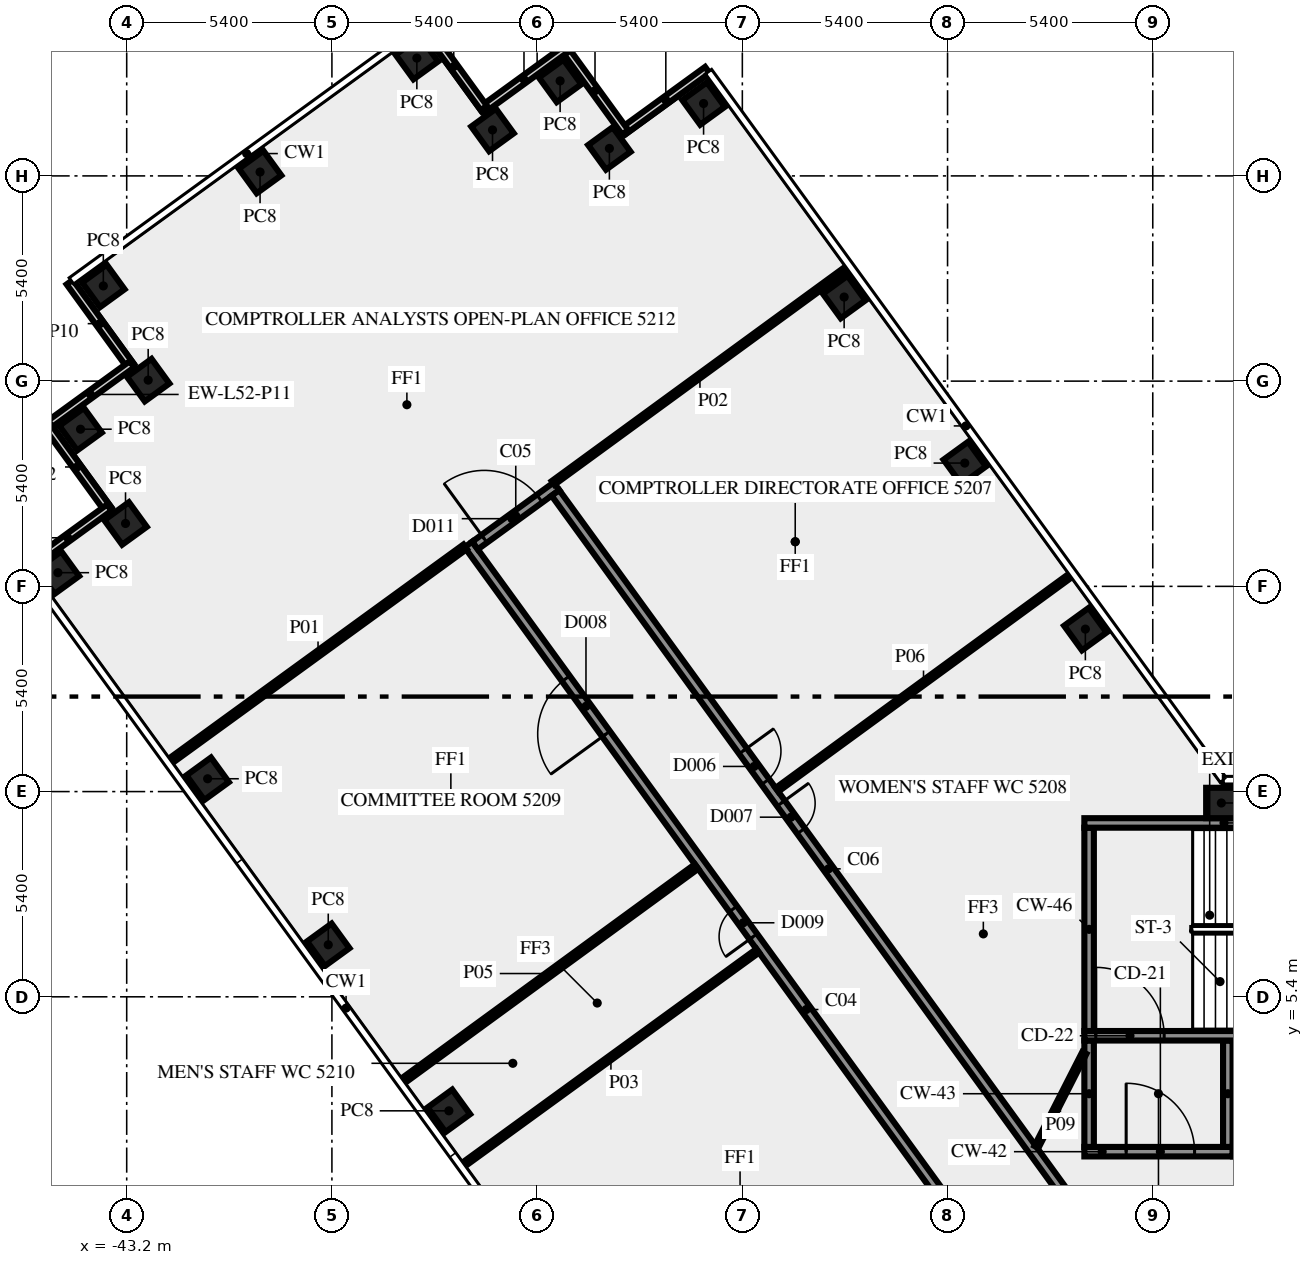
"""IFC4 building model, lengths in metres.
Left out: names, types, materials, properties, quantities, classifications, styles, units other than length and angle.
Written with IfcOpenShell. Run it as: python <this file> out.ifc"""

import sys

from ifc_helpers import new_model, si_unit, direction, frame, frame_2d, origin, origin_2d, place, context, subcontext, project, spatial, rectangle, extrude, element, fill, save


model = new_model("IFC4")
c1 = context("Model", 3, precision=1e-05, world=origin(), true_north=direction((0.0, 1.0)))
c2 = subcontext(c1, "Body", "Model", "MODEL_VIEW")
j1 = project(units=[si_unit("LENGTHUNIT", "METRE"), si_unit("PLANEANGLEUNIT", "RADIAN")], contexts=[c1])
p1 = place(None, origin())
s1 = spatial("IfcSite", under=j1, at=p1, CompositionType="ELEMENT")
p2 = place(p1, origin())
s2 = spatial("IfcBuilding", under=s1, at=p2, CompositionType="ELEMENT")
p3 = place(p2, frame((0.0, 0.0, 222.0)))
s3 = spatial("IfcBuildingStorey", under=s2, at=p3, CompositionType="ELEMENT", Elevation=222.0)
for number, where, z_axis, x_axis in (
    (1, (-17.974, 15.075, 0.0), (0.0, 0.0, 1.0), (-0.588, 0.809, 0.0)),
    (2, (-21.147, 19.444, 0.0), (0.0, 0.0, 1.0), (-0.588, 0.809, 0.0)),
    (3, (-24.321, 23.812, 0.0), (0.0, 0.0, 1.0), (-0.588, 0.809, 0.0)),
    (4, (-28.02, 28.905, 0.0), (0.0, 0.0, 1.0), (-0.809, -0.588, 0.0)),
    (5, (-30.499, 27.723, 0.0), (0.0, 0.0, 1.0), (-0.809, -0.588, 0.0)),
    (6, (-31.795, 29.5, 0.0), (0.0, 0.0, 1.0), (-0.588, 0.809, 0.0)),
    (7, (-33.574, 28.209, 0.0), (0.0, 0.0, 1.0), (-0.588, 0.809, 0.0)),
    (8, (-35.565, 30.1, 0.0), (0.0, 0.0, 1.0), (-0.809, -0.588, 0.0)),
    (9, (-39.691, 27.102, 0.0), (0.0, 0.0, 1.0), (-0.809, -0.588, 0.0)),
    (10, (-43.815, 24.105, 0.0), (0.0, 0.0, 1.0), (-0.809, -0.588, 0.0)),
    (11, (-42.635, 21.626, 0.0), (0.0, 0.0, 1.0), (-0.809, -0.588, 0.0)),
    (12, (-44.415, 20.335, 0.0), (0.0, 0.0, 1.0), (0.588, -0.809, 0.0)),
    (13, (-43.231, 17.854, 0.0), (0.0, 0.0, 1.0), (0.588, -0.809, 0.0)),
    (14, (-45.01, 16.56, 0.0), (0.0, 0.0, 1.0), (0.588, -0.809, 0.0)),
    (15, (-41.07, 11.137, 0.0), (0.0, 0.0, 1.0), (0.588, -0.809, 0.0)),
    (16, (-37.896, 6.769, 0.0), (0.0, 0.0, 1.0), (0.588, -0.809, 0.0)),
    (17, (-34.722, 2.4, 0.0), (0.0, 0.0, 1.0), (0.588, -0.809, 0.0)),
    (18, (-14.395, 10.5, 0.0), (0.0, 0.0, 1.0), (-1.0, 0.0, 0.0)),
):
    element("IfcColumn", number, at=place(p3, frame(where, z_axis=z_axis, x_axis=x_axis)), inside=s3, PredefinedType="COLUMN", context=c2, shape_type="SweptSolid", body=[
        extrude(rectangle(XDim=0.8, YDim=0.8, at=origin_2d()), origin(), (0.0, 0.0, 1.0), 3.65),
    ])
for number, where, z_axis, x_axis in (
    (19, (-27.921, 29.787, 0.0), (0.0, 0.0, 1.0), (-0.809, -0.588, 0.0)),
    (20, (-30.083, 28.149, 0.0), (0.0, 0.0, 1.0), (-0.588, 0.809, 0.0)),
    (21, (-31.654, 30.331, 0.0), (0.0, 0.0, 1.0), (-0.809, -0.588, 0.0)),
    (22, (-33.801, 28.786, 0.0), (0.0, 0.0, 1.0), (-0.588, 0.809, 0.0)),
    (23, (-44.699, 24.205, 0.0), (0.0, 0.0, 1.0), (0.588, -0.809, 0.0)),
    (24, (-43.061, 22.043, 0.0), (0.0, 0.0, 1.0), (-0.809, -0.588, 0.0)),
    (25, (-45.296, 20.434, 0.0), (0.0, 0.0, 1.0), (0.588, -0.809, 0.0)),
    (26, (-43.658, 18.272, 0.0), (0.0, 0.0, 1.0), (-0.809, -0.588, 0.0)),
):
    element("IfcWall", number, at=place(p3, frame(where, z_axis=z_axis, x_axis=x_axis)), inside=s3, PredefinedType="SOLIDWALL", context=c2, shape_type="SweptSolid", body=[
        extrude(rectangle(XDim=2.7, YDim=0.2, at=frame_2d((1.35, 0.0))), origin(), (0.0, 0.0, 1.0), 3.65),
    ])
p4 = place(p3, frame((-18.0, 1.325, 0.0), z_axis=(0.0, 0.0, 1.0), x_axis=(1.0, 0.0, 0.0)))
e27 = element("IfcWall", 27, at=p4, inside=s3, PredefinedType="SHEAR", context=c2, shape_type="SweptSolid", body=[
    extrude(rectangle(XDim=3.9, YDim=0.25, at=frame_2d((1.95, 0.0))), origin(), (0.0, 0.0, 1.0), 3.65),
])
p5 = place(p4, frame((1.1, 0.0, 0.0)))
e28 = element("IfcOpeningElement", 28, at=p5, cuts=e27, PredefinedType="OPENING", context=c2, shape_type="SweptSolid", body=[
    extrude(rectangle(XDim=1.8, YDim=2.1, at=frame_2d((0.9, 1.05))), frame((0.0, 0.135, 0.0), z_axis=(0.0, -1.0, 0.0), x_axis=(1.0, 0.0, 0.0)), (0.0, 0.0, 1.0), 0.27),
])
for number, where, z_axis, x_axis in (
    (29, (-17.875, 1.45, 0.0), (0.0, 0.0, 1.0), (0.0, 1.0, 0.0)),
    (30, (-14.225, 1.45, 0.0), (0.0, 0.0, 1.0), (0.0, 1.0, 0.0)),
):
    element("IfcWall", number, at=place(p3, frame(where, z_axis=z_axis, x_axis=x_axis)), inside=s3, PredefinedType="SHEAR", context=c2, shape_type="SweptSolid", body=[
        extrude(rectangle(XDim=2.8, YDim=0.25, at=frame_2d((1.4, 0.0))), origin(), (0.0, 0.0, 1.0), 3.65),
    ])
p6 = place(p3, frame((-18.0, 4.375, 0.0), z_axis=(0.0, 0.0, 1.0), x_axis=(1.0, 0.0, 0.0)))
e31 = element("IfcWall", 31, at=p6, inside=s3, PredefinedType="SHEAR", context=c2, shape_type="SweptSolid", body=[
    extrude(rectangle(XDim=10.5, YDim=0.25, at=frame_2d((5.25, 0.0))), origin(), (0.0, 0.0, 1.0), 3.65),
])
p7 = place(p6, frame((0.3, 0.0, 0.0)))
e32 = element("IfcOpeningElement", 32, at=p7, cuts=e31, PredefinedType="OPENING", context=c2, shape_type="SweptSolid", body=[
    extrude(rectangle(XDim=1.8, YDim=2.1, at=frame_2d((0.9, 1.05))), frame((0.0, 0.135, 0.0), z_axis=(0.0, -1.0, 0.0), x_axis=(1.0, 0.0, 0.0)), (0.0, 0.0, 1.0), 0.27),
])
p8 = place(p3, frame((-17.875, 4.5, 0.0), z_axis=(0.0, 0.0, 1.0), x_axis=(0.0, 1.0, 0.0)))
e33 = element("IfcWall", 33, at=p8, inside=s3, PredefinedType="SHEAR", context=c2, shape_type="SweptSolid", body=[
    extrude(rectangle(XDim=5.35, YDim=0.25, at=frame_2d((2.675, 0.0))), origin(), (0.0, 0.0, 1.0), 3.65),
])
p9 = place(p3, frame((-18.0, 9.975, 0.0), z_axis=(0.0, 0.0, 1.0), x_axis=(1.0, 0.0, 0.0)))
e34 = element("IfcWall", 34, at=p9, inside=s3, PredefinedType="SHEAR", context=c2, shape_type="SweptSolid", body=[
    extrude(rectangle(XDim=10.5, YDim=0.25, at=frame_2d((5.25, 0.0))), origin(), (0.0, 0.0, 1.0), 3.65),
])
p10 = place(p9, frame((4.5, 0.0, 1.0)))
e35 = element("IfcOpeningElement", 35, at=p10, cuts=e34, PredefinedType="OPENING", context=c2, shape_type="SweptSolid", body=[
    extrude(rectangle(XDim=1.2, YDim=1.2, at=frame_2d((0.6, 0.6))), frame((0.0, 0.135, 0.0), z_axis=(0.0, -1.0, 0.0), x_axis=(1.0, 0.0, 0.0)), (0.0, 0.0, 1.0), 0.27),
])
p11 = place(p3, frame((-20.531, -1.523, 0.0), z_axis=(0.0, 0.0, 1.0), x_axis=(-0.587784239999, 0.809017729849, 0.0)))
e36 = element("IfcWall", 36, at=p11, inside=s3, PredefinedType="SOLIDWALL", context=c2, shape_type="SweptSolid", body=[
    extrude(rectangle(XDim=23.271, YDim=0.25, at=frame_2d((11.635, 0.0))), origin(), (0.0, 0.0, 1.0), 3.65),
])
p12 = place(p11, frame((0.533, 0.0, 0.0)))
e37 = element("IfcOpeningElement", 37, at=p12, cuts=e36, PredefinedType="OPENING", context=c2, shape_type="SweptSolid", body=[
    extrude(rectangle(XDim=0.9, YDim=2.1, at=frame_2d((0.45, 1.05))), frame((0.0, 0.135, 0.0), z_axis=(0.0, -1.0, 0.0), x_axis=(1.0, 0.0, 0.0)), (0.0, 0.0, 1.0), 0.27),
])
p13 = place(p11, frame((17.106, 0.0, 0.0)))
e38 = element("IfcOpeningElement", 38, at=p13, cuts=e36, PredefinedType="OPENING", context=c2, shape_type="SweptSolid", body=[
    extrude(rectangle(XDim=1.8, YDim=2.1, at=frame_2d((0.9, 1.05))), frame((0.0, 0.135, 0.0), z_axis=(0.0, -1.0, 0.0), x_axis=(1.0, 0.0, 0.0)), (0.0, 0.0, 1.0), 0.27),
])
p14 = place(p11, frame((10.516, 0.0, 0.0)))
e39 = element("IfcOpeningElement", 39, at=p14, cuts=e36, PredefinedType="OPENING", context=c2, shape_type="SweptSolid", body=[
    extrude(rectangle(XDim=0.9, YDim=2.1, at=frame_2d((0.45, 1.05))), frame((0.0, 0.135, 0.0), z_axis=(0.0, -1.0, 0.0), x_axis=(1.0, 0.0, 0.0)), (0.0, 0.0, 1.0), 0.27),
])
p15 = place(p3, frame((-34.034, 17.275, 0.0), z_axis=(0.0, 0.0, 1.0), x_axis=(0.809006914995, 0.587799125119, 0.0)))
e40 = element("IfcWall", 40, at=p15, inside=s3, PredefinedType="SOLIDWALL", context=c2, shape_type="SweptSolid", body=[
    extrude(rectangle(XDim=2.65, YDim=0.25, at=frame_2d((1.325, 0.0))), origin(), (0.0, 0.0, 1.0), 3.65),
])
p16 = place(p15, frame((0.3, 0.0, 0.0)))
e41 = element("IfcOpeningElement", 41, at=p16, cuts=e40, PredefinedType="OPENING", context=c2, shape_type="SweptSolid", body=[
    extrude(rectangle(XDim=1.8, YDim=2.1, at=frame_2d((0.9, 1.05))), frame((0.0, 0.135, 0.0), z_axis=(0.0, -1.0, 0.0), x_axis=(1.0, 0.0, 0.0)), (0.0, 0.0, 1.0), 0.27),
])
p17 = place(p3, frame((-31.918, 18.658, 0.0), z_axis=(0.0, 0.0, 1.0), x_axis=(0.587788731405, -0.80901446664, 0.0)))
e42 = element("IfcWall", 42, at=p17, inside=s3, PredefinedType="SOLIDWALL", context=c2, shape_type="SweptSolid", body=[
    extrude(rectangle(XDim=24.453, YDim=0.25, at=frame_2d((12.227, 0.0))), origin(), (0.0, 0.0, 1.0), 3.65),
])
p18 = place(p17, frame((8.395, 0.0, 0.0)))
e43 = element("IfcOpeningElement", 43, at=p18, cuts=e42, PredefinedType="OPENING", context=c2, shape_type="SweptSolid", body=[
    extrude(rectangle(XDim=1.0, YDim=2.1, at=frame_2d((0.5, 1.05))), frame((0.0, 0.135, 0.0), z_axis=(0.0, -1.0, 0.0), x_axis=(1.0, 0.0, 0.0)), (0.0, 0.0, 1.0), 0.27),
])
p19 = place(p17, frame((10.095, 0.0, 0.0)))
e44 = element("IfcOpeningElement", 44, at=p19, cuts=e42, PredefinedType="OPENING", context=c2, shape_type="SweptSolid", body=[
    extrude(rectangle(XDim=0.9, YDim=2.1, at=frame_2d((0.45, 1.05))), frame((0.0, 0.135, 0.0), z_axis=(0.0, -1.0, 0.0), x_axis=(1.0, 0.0, 0.0)), (0.0, 0.0, 1.0), 0.27),
])
p20 = place(p3, frame((-42.036, 11.615, 0.0), z_axis=(0.0, 0.0, 1.0), x_axis=(0.808985331811, 0.587828829605, 0.0)))
e45 = element("IfcWall", 45, at=p20, inside=s3, PredefinedType="PARTITIONING", context=c2, shape_type="SweptSolid", body=[
    extrude(rectangle(XDim=9.57, YDim=0.15, at=frame_2d((4.785, 0.0))), origin(), (0.0, 0.0, 1.0), 2.85),
])
p21 = place(p3, frame((-31.98, 18.922, 0.0), z_axis=(0.0, 0.0, 1.0), x_axis=(0.807588329082, 0.589746632657, 0.0)))
e46 = element("IfcWall", 46, at=p21, inside=s3, PredefinedType="PARTITIONING", context=c2, shape_type="SweptSolid", body=[
    extrude(rectangle(XDim=9.57, YDim=0.12, at=frame_2d((4.785, 0.0))), origin(), (0.0, 0.0, 1.0), 2.85),
])
p22 = place(p3, frame((-26.595, 6.611, 0.0), z_axis=(0.0, 0.0, 1.0), x_axis=(-0.80900684162, -0.587799226107, 0.0)))
e47 = element("IfcWall", 47, at=p22, inside=s3, PredefinedType="PARTITIONING", context=c2, shape_type="SweptSolid", body=[
    extrude(rectangle(XDim=9.55, YDim=0.12, at=frame_2d((4.775, 0.0))), origin(), (0.0, 0.0, 1.0), 2.85),
])
p23 = place(p3, frame((-35.919, 3.197, 0.0), z_axis=(0.0, 0.0, 1.0), x_axis=(0.807645841498, 0.589667868135, 0.0)))
e48 = element("IfcWall", 48, at=p23, inside=s3, PredefinedType="PARTITIONING", context=c2, shape_type="SweptSolid", body=[
    extrude(rectangle(XDim=9.551, YDim=0.15, at=frame_2d((4.775, 0.0))), origin(), (0.0, 0.0, 1.0), 2.85),
])
p24 = place(p3, frame((-26.089, 10.848, 0.0), z_axis=(0.0, 0.0, 1.0), x_axis=(0.807661302092, 0.589646691759, 0.0)))
e49 = element("IfcWall", 49, at=p24, inside=s3, PredefinedType="PARTITIONING", context=c2, shape_type="SweptSolid", body=[
    extrude(rectangle(XDim=9.55, YDim=0.12, at=frame_2d((4.775, 0.0))), origin(), (0.0, 0.0, 1.0), 2.85),
])
p25 = place(p3, frame((-19.261, 1.45, 0.0), z_axis=(0.0, 0.0, 1.0), x_axis=(0.453950796792, 0.891026752736, 0.0)))
e50 = element("IfcWall", 50, at=p25, inside=s3, PredefinedType="PARTITIONING", context=c2, shape_type="SweptSolid", body=[
    extrude(rectangle(XDim=2.778, YDim=0.12, at=frame_2d((1.389, 0.0))), origin(), (0.0, 0.0, 1.0), 3.65),
])
p26 = place(p5, origin())
e51 = element("IfcDoor", 51, at=p26, inside=s3, OperationType="DOUBLE_DOOR_SINGLE_SWING", PredefinedType="DOOR", context=c2, shape_type="SweptSolid", body=[
    extrude(rectangle(XDim=1.8, YDim=2.1, at=frame_2d((0.9, 1.05))), frame((0.0, 0.025, 0.0), z_axis=(0.0, -1.0, 0.0), x_axis=(1.0, 0.0, 0.0)), (0.0, 0.0, 1.0), 0.05),
])
fill(e28, e51)
p27 = place(p7, origin())
e52 = element("IfcDoor", 52, at=p27, inside=s3, OperationType="DOUBLE_DOOR_SINGLE_SWING", PredefinedType="DOOR", context=c2, shape_type="SweptSolid", body=[
    extrude(rectangle(XDim=1.8, YDim=2.1, at=frame_2d((0.9, 1.05))), frame((0.0, 0.025, 0.0), z_axis=(0.0, -1.0, 0.0), x_axis=(1.0, 0.0, 0.0)), (0.0, 0.0, 1.0), 0.05),
])
fill(e32, e52)
p28 = place(p16, origin())
e53 = element("IfcDoor", 53, at=p28, inside=s3, OperationType="DOUBLE_DOOR_SINGLE_SWING", PredefinedType="DOOR", context=c2, shape_type="SweptSolid", body=[
    extrude(rectangle(XDim=1.8, YDim=2.1, at=frame_2d((0.9, 1.05))), frame((0.0, 0.025, 0.0), z_axis=(0.0, -1.0, 0.0), x_axis=(1.0, 0.0, 0.0)), (0.0, 0.0, 1.0), 0.05),
])
fill(e41, e53)
p29 = place(p13, origin())
e54 = element("IfcDoor", 54, at=p29, inside=s3, OperationType="DOUBLE_DOOR_SINGLE_SWING", PredefinedType="DOOR", context=c2, shape_type="SweptSolid", body=[
    extrude(rectangle(XDim=1.8, YDim=2.1, at=frame_2d((0.9, 1.05))), frame((0.0, 0.025, 0.0), z_axis=(0.0, -1.0, 0.0), x_axis=(1.0, 0.0, 0.0)), (0.0, 0.0, 1.0), 0.05),
])
fill(e38, e54)
p30 = place(p18, origin())
e55 = element("IfcDoor", 55, at=p30, inside=s3, OperationType="SINGLE_SWING_RIGHT", PredefinedType="DOOR", context=c2, shape_type="SweptSolid", body=[
    extrude(rectangle(XDim=1.0, YDim=2.1, at=frame_2d((0.5, 1.05))), frame((0.0, 0.025, 0.0), z_axis=(0.0, -1.0, 0.0), x_axis=(1.0, 0.0, 0.0)), (0.0, 0.0, 1.0), 0.05),
])
fill(e43, e55)
p31 = place(p19, origin())
e56 = element("IfcDoor", 56, at=p31, inside=s3, OperationType="SINGLE_SWING_LEFT", PredefinedType="DOOR", context=c2, shape_type="SweptSolid", body=[
    extrude(rectangle(XDim=0.9, YDim=2.1, at=frame_2d((0.45, 1.05))), frame((0.0, 0.025, 0.0), z_axis=(0.0, -1.0, 0.0), x_axis=(1.0, 0.0, 0.0)), (0.0, 0.0, 1.0), 0.05),
])
fill(e44, e56)
p32 = place(p14, origin())
e57 = element("IfcDoor", 57, at=p32, inside=s3, OperationType="SINGLE_SWING_LEFT", PredefinedType="DOOR", context=c2, shape_type="SweptSolid", body=[
    extrude(rectangle(XDim=0.9, YDim=2.1, at=frame_2d((0.45, 1.05))), frame((0.0, 0.025, 0.0), z_axis=(0.0, -1.0, 0.0), x_axis=(1.0, 0.0, 0.0)), (0.0, 0.0, 1.0), 0.05),
])
fill(e39, e57)
save(model, sys.argv[1])
